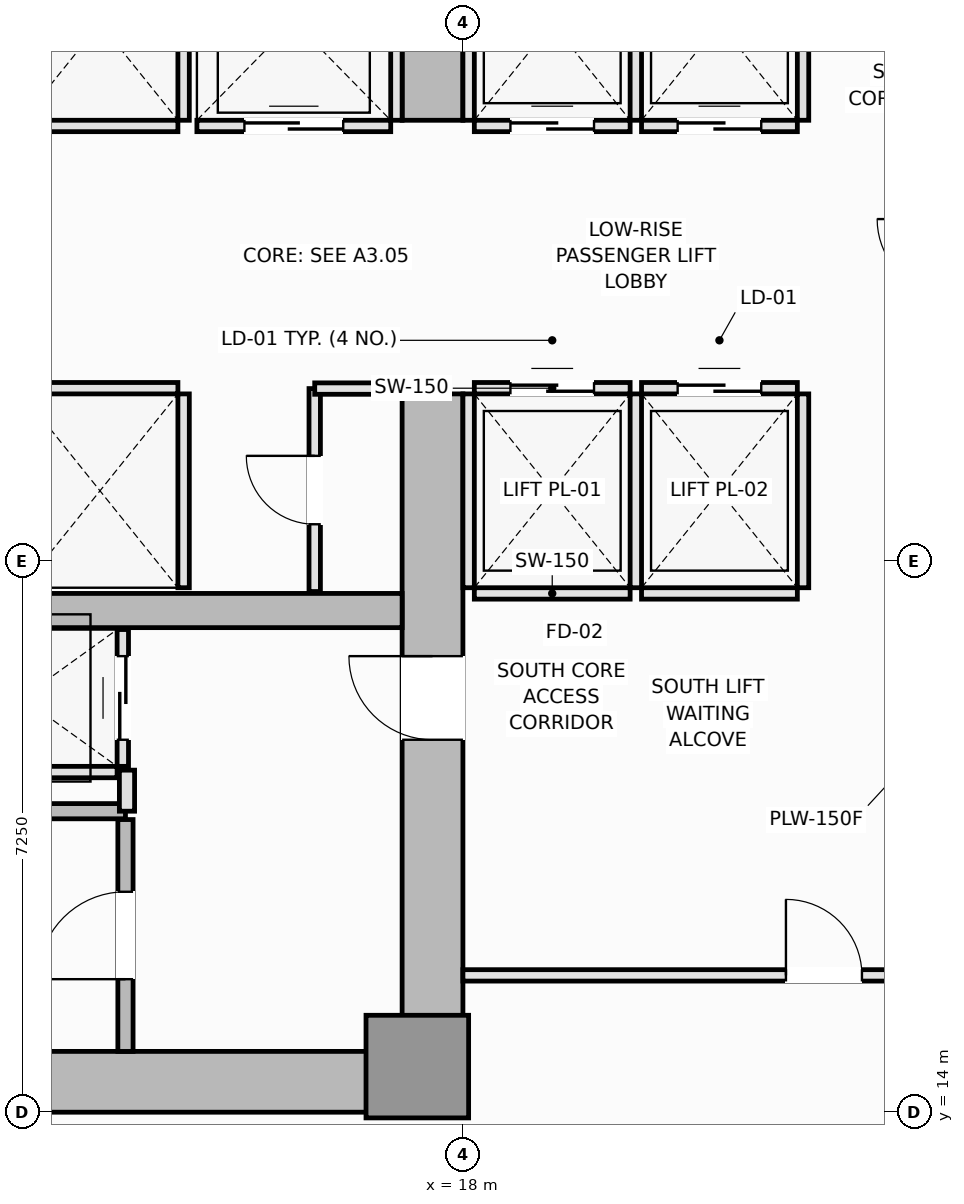
"""IFC4 building model, lengths in metres.
Left out: names, types, materials, properties, quantities, classifications, styles, units other than length and angle.
Written with IfcOpenShell. Run it as: python <this file> out.ifc"""

import sys

from ifc_helpers import new_model, si_unit, direction, frame, frame_2d, origin, origin_2d, place, context, subcontext, project, spatial, rectangle, extrude, element, fill, save


model = new_model("IFC4")
c1 = context("Model", 3, precision=1e-05, world=origin(), true_north=direction((0.0, 1.0)))
c2 = subcontext(c1, "Body", "Model", "MODEL_VIEW")
j1 = project(units=[si_unit("LENGTHUNIT", "METRE"), si_unit("PLANEANGLEUNIT", "RADIAN")], contexts=[c1])
p1 = place(None, origin())
s1 = spatial("IfcSite", under=j1, at=p1, CompositionType="ELEMENT")
p2 = place(p1, origin())
s2 = spatial("IfcBuilding", under=s1, at=p2, CompositionType="ELEMENT")
p3 = place(p2, frame((0.0, 0.0, 75.3)))
s3 = spatial("IfcBuildingStorey", under=s2, at=p3, CompositionType="ELEMENT", Elevation=75.3)
p4 = place(p3, frame((4.5, 14.4, 0.0), z_axis=(0.0, 0.0, 1.0), x_axis=(1.0, 0.0, 0.0)))
e1 = element("IfcWall", 1, at=p4, inside=s3, PredefinedType="SHEAR", context=c2, shape_type="SweptSolid", body=[
    extrude(rectangle(XDim=13.5, YDim=0.8, at=frame_2d((6.75, 0.0))), origin(), (0.0, 0.0, 1.0), 3.55),
])
p5 = place(p3, frame((17.6, 14.8, 0.0), z_axis=(0.0, 0.0, 1.0), x_axis=(0.0, 1.0, 0.0)))
e2 = element("IfcWall", 2, at=p5, inside=s3, PredefinedType="SHEAR", context=c2, shape_type="SweptSolid", body=[
    extrude(rectangle(XDim=8.65, YDim=0.8, at=frame_2d((4.325, 0.0))), origin(), (0.0, 0.0, 1.0), 3.55),
])
p6 = place(p5, frame((4.1, 0.0, 0.0)))
e3 = element("IfcOpeningElement", 3, at=p6, cuts=e2, PredefinedType="OPENING", context=c2, shape_type="SweptSolid", body=[
    extrude(rectangle(XDim=1.1, YDim=2.15, at=frame_2d((0.55, 1.075))), frame((0.0, 0.41, 0.0), z_axis=(0.0, -1.0, 0.0), x_axis=(1.0, 0.0, 0.0)), (0.0, 0.0, 1.0), 0.82),
])
p7 = place(p3, frame((17.6, 27.05, 0.0), z_axis=(0.0, 0.0, 1.0), x_axis=(0.0, 1.0, 0.0)))
e4 = element("IfcWall", 4, at=p7, inside=s3, PredefinedType="SHEAR", context=c2, shape_type="SweptSolid", body=[
    extrude(rectangle(XDim=8.65, YDim=0.8, at=frame_2d((4.325, 0.0))), origin(), (0.0, 0.0, 1.0), 3.55),
])
p8 = place(p7, frame((3.45, 0.0, 0.0)))
e5 = element("IfcOpeningElement", 5, at=p8, cuts=e4, PredefinedType="OPENING", context=c2, shape_type="SweptSolid", body=[
    extrude(rectangle(XDim=1.1, YDim=2.15, at=frame_2d((0.55, 1.075))), frame((0.0, 0.41, 0.0), z_axis=(0.0, -1.0, 0.0), x_axis=(1.0, 0.0, 0.0)), (0.0, 0.0, 1.0), 0.82),
])
p9 = place(p3, frame((5.3, 20.6, 0.0), z_axis=(0.0, 0.0, 1.0), x_axis=(1.0, 0.0, 0.0)))
e6 = element("IfcWall", 6, at=p9, inside=s3, PredefinedType="SHEAR", context=c2, shape_type="SweptSolid", body=[
    extrude(rectangle(XDim=11.9, YDim=0.45, at=frame_2d((5.95, 0.0))), origin(), (0.0, 0.0, 1.0), 3.55),
])
p10 = place(p3, frame((17.4, 14.6, 0.0), z_axis=(0.0, 0.0, 1.0), x_axis=(1.0, 0.0, 0.0)))
e7 = element("IfcColumn", 7, at=p10, inside=s3, PredefinedType="PILASTER", context=c2, shape_type="SweptSolid", body=[
    extrude(rectangle(XDim=1.35, YDim=1.35, at=origin_2d()), origin(), (0.0, 0.0, 1.0), 3.55),
])
p11 = place(p3, frame((5.9, 17.96, 0.0), z_axis=(0.0, 0.0, 1.0), x_axis=(1.0, 0.0, 0.0)))
e8 = element("IfcWall", 8, at=p11, inside=s3, PredefinedType="SOLIDWALL", context=c2, shape_type="SweptSolid", body=[
    extrude(rectangle(XDim=7.66, YDim=0.2, at=frame_2d((3.83, 0.0))), origin(), (0.0, 0.0, 1.0), 3.55),
])
p12 = place(p3, frame((13.56, 14.8, 0.0), z_axis=(0.0, 0.0, 1.0), x_axis=(0.0, 1.0, 0.0)))
e9 = element("IfcWall", 9, at=p12, inside=s3, PredefinedType="SOLIDWALL", context=c2, shape_type="SweptSolid", body=[
    extrude(rectangle(XDim=3.05, YDim=0.2, at=frame_2d((1.525, 0.0))), origin(), (0.0, 0.0, 1.0), 3.55),
])
p13 = place(p12, frame((0.95, 0.0, 0.0)))
e10 = element("IfcOpeningElement", 10, at=p13, cuts=e9, PredefinedType="OPENING", context=c2, shape_type="SweptSolid", body=[
    extrude(rectangle(XDim=1.15, YDim=2.15, at=frame_2d((0.575, 1.075))), frame((0.0, 0.11, 0.0), z_axis=(0.0, -1.0, 0.0), x_axis=(1.0, 0.0, 0.0)), (0.0, 0.0, 1.0), 0.22),
])
p14 = place(p3, frame((18.15, 20.825, 0.0), z_axis=(0.0, 0.0, 1.0), x_axis=(1.0, 0.0, 0.0)))
e11 = element("IfcWall", 11, at=p14, inside=s3, PredefinedType="PARTITIONING", context=c2, shape_type="SweptSolid", body=[
    extrude(rectangle(XDim=2.05, YDim=0.15, at=frame_2d((1.025, 0.0))), origin(), (0.0, 0.0, 1.0), 3.37),
])
p15 = place(p3, frame((18.15, 23.525, 0.0), z_axis=(0.0, 0.0, 1.0), x_axis=(1.0, 0.0, 0.0)))
e12 = element("IfcWall", 12, at=p15, inside=s3, PredefinedType="PARTITIONING", context=c2, shape_type="SweptSolid", body=[
    extrude(rectangle(XDim=2.05, YDim=0.15, at=frame_2d((1.025, 0.0))), origin(), (0.0, 0.0, 1.0), 3.37),
])
p16 = place(p15, frame((0.475, 0.0, 0.0)))
e13 = element("IfcOpeningElement", 13, at=p16, cuts=e12, PredefinedType="OPENING", context=c2, shape_type="SweptSolid", body=[
    extrude(rectangle(XDim=1.1, YDim=2.2, at=frame_2d((0.55, 1.1))), frame((0.0, 0.085, 0.0), z_axis=(0.0, -1.0, 0.0), x_axis=(1.0, 0.0, 0.0)), (0.0, 0.0, 1.0), 0.17),
])
for number, where, z_axis, x_axis in (
    (14, (18.075, 20.9, 0.0), (0.0, 0.0, 1.0), (0.0, 1.0, 0.0)),
    (15, (20.275, 20.9, 0.0), (0.0, 0.0, 1.0), (0.0, 1.0, 0.0)),
):
    element("IfcWall", number, at=place(p3, frame(where, z_axis=z_axis, x_axis=x_axis)), inside=s3, PredefinedType="PARTITIONING", context=c2, shape_type="SweptSolid", body=[
        extrude(rectangle(XDim=2.55, YDim=0.15, at=frame_2d((1.275, 0.0))), origin(), (0.0, 0.0, 1.0), 3.37),
    ])
p17 = place(p3, frame((20.35, 20.825, 0.0), z_axis=(0.0, 0.0, 1.0), x_axis=(1.0, 0.0, 0.0)))
e16 = element("IfcWall", 16, at=p17, inside=s3, PredefinedType="PARTITIONING", context=c2, shape_type="SweptSolid", body=[
    extrude(rectangle(XDim=2.05, YDim=0.15, at=frame_2d((1.025, 0.0))), origin(), (0.0, 0.0, 1.0), 3.37),
])
p18 = place(p3, frame((20.35, 23.525, 0.0), z_axis=(0.0, 0.0, 1.0), x_axis=(1.0, 0.0, 0.0)))
e17 = element("IfcWall", 17, at=p18, inside=s3, PredefinedType="PARTITIONING", context=c2, shape_type="SweptSolid", body=[
    extrude(rectangle(XDim=2.05, YDim=0.15, at=frame_2d((1.025, 0.0))), origin(), (0.0, 0.0, 1.0), 3.37),
])
p19 = place(p18, frame((0.475, 0.0, 0.0)))
e18 = element("IfcOpeningElement", 18, at=p19, cuts=e17, PredefinedType="OPENING", context=c2, shape_type="SweptSolid", body=[
    extrude(rectangle(XDim=1.1, YDim=2.2, at=frame_2d((0.55, 1.1))), frame((0.0, 0.085, 0.0), z_axis=(0.0, -1.0, 0.0), x_axis=(1.0, 0.0, 0.0)), (0.0, 0.0, 1.0), 0.17),
])
p20 = place(p3, frame((22.475, 20.9, 0.0), z_axis=(0.0, 0.0, 1.0), x_axis=(0.0, 1.0, 0.0)))
e19 = element("IfcWall", 19, at=p20, inside=s3, PredefinedType="PARTITIONING", context=c2, shape_type="SweptSolid", body=[
    extrude(rectangle(XDim=2.55, YDim=0.15, at=frame_2d((1.275, 0.0))), origin(), (0.0, 0.0, 1.0), 3.37),
])
p21 = place(p3, frame((18.15, 26.975, 0.0), z_axis=(0.0, 0.0, 1.0), x_axis=(1.0, 0.0, 0.0)))
e20 = element("IfcWall", 20, at=p21, inside=s3, PredefinedType="PARTITIONING", context=c2, shape_type="SweptSolid", body=[
    extrude(rectangle(XDim=2.05, YDim=0.15, at=frame_2d((1.025, 0.0))), origin(), (0.0, 0.0, 1.0), 3.37),
])
p22 = place(p21, frame((0.475, 0.0, 0.0)))
e21 = element("IfcOpeningElement", 21, at=p22, cuts=e20, PredefinedType="OPENING", context=c2, shape_type="SweptSolid", body=[
    extrude(rectangle(XDim=1.1, YDim=2.2, at=frame_2d((0.55, 1.1))), frame((0.0, 0.085, 0.0), z_axis=(0.0, -1.0, 0.0), x_axis=(1.0, 0.0, 0.0)), (0.0, 0.0, 1.0), 0.17),
])
for number, where, z_axis, x_axis in (
    (22, (18.075, 27.05, 0.0), (0.0, 0.0, 1.0), (0.0, 1.0, 0.0)),
    (23, (20.275, 27.05, 0.0), (0.0, 0.0, 1.0), (0.0, 1.0, 0.0)),
):
    element("IfcWall", number, at=place(p3, frame(where, z_axis=z_axis, x_axis=x_axis)), inside=s3, PredefinedType="PARTITIONING", context=c2, shape_type="SweptSolid", body=[
        extrude(rectangle(XDim=2.55, YDim=0.15, at=frame_2d((1.275, 0.0))), origin(), (0.0, 0.0, 1.0), 3.37),
    ])
p23 = place(p3, frame((20.35, 26.975, 0.0), z_axis=(0.0, 0.0, 1.0), x_axis=(1.0, 0.0, 0.0)))
e24 = element("IfcWall", 24, at=p23, inside=s3, PredefinedType="PARTITIONING", context=c2, shape_type="SweptSolid", body=[
    extrude(rectangle(XDim=2.05, YDim=0.15, at=frame_2d((1.025, 0.0))), origin(), (0.0, 0.0, 1.0), 3.37),
])
p24 = place(p23, frame((0.475, 0.0, 0.0)))
e25 = element("IfcOpeningElement", 25, at=p24, cuts=e24, PredefinedType="OPENING", context=c2, shape_type="SweptSolid", body=[
    extrude(rectangle(XDim=1.1, YDim=2.2, at=frame_2d((0.55, 1.1))), frame((0.0, 0.085, 0.0), z_axis=(0.0, -1.0, 0.0), x_axis=(1.0, 0.0, 0.0)), (0.0, 0.0, 1.0), 0.17),
])
p25 = place(p3, frame((22.475, 27.05, 0.0), z_axis=(0.0, 0.0, 1.0), x_axis=(0.0, 1.0, 0.0)))
e26 = element("IfcWall", 26, at=p25, inside=s3, PredefinedType="PARTITIONING", context=c2, shape_type="SweptSolid", body=[
    extrude(rectangle(XDim=2.55, YDim=0.15, at=frame_2d((1.275, 0.0))), origin(), (0.0, 0.0, 1.0), 3.37),
])
p26 = place(p3, frame((12.2, 23.525, 0.0), z_axis=(0.0, 0.0, 1.0), x_axis=(1.0, 0.0, 0.0)))
e27 = element("IfcWall", 27, at=p26, inside=s3, PredefinedType="PARTITIONING", context=c2, shape_type="SweptSolid", body=[
    extrude(rectangle(XDim=2.05, YDim=0.15, at=frame_2d((1.025, 0.0))), origin(), (0.0, 0.0, 1.0), 3.37),
])
p27 = place(p3, frame((14.325, 20.9, 0.0), z_axis=(0.0, 0.0, 1.0), x_axis=(0.0, 1.0, 0.0)))
e28 = element("IfcWall", 28, at=p27, inside=s3, PredefinedType="PARTITIONING", context=c2, shape_type="SweptSolid", body=[
    extrude(rectangle(XDim=2.55, YDim=0.15, at=frame_2d((1.275, 0.0))), origin(), (0.0, 0.0, 1.0), 3.37),
])
p28 = place(p3, frame((12.2, 26.975, 0.0), z_axis=(0.0, 0.0, 1.0), x_axis=(1.0, 0.0, 0.0)))
e29 = element("IfcWall", 29, at=p28, inside=s3, PredefinedType="PARTITIONING", context=c2, shape_type="SweptSolid", body=[
    extrude(rectangle(XDim=2.05, YDim=0.15, at=frame_2d((1.025, 0.0))), origin(), (0.0, 0.0, 1.0), 3.37),
])
p29 = place(p3, frame((14.325, 27.05, 0.0), z_axis=(0.0, 0.0, 1.0), x_axis=(0.0, 1.0, 0.0)))
e30 = element("IfcWall", 30, at=p29, inside=s3, PredefinedType="PARTITIONING", context=c2, shape_type="SweptSolid", body=[
    extrude(rectangle(XDim=2.55, YDim=0.15, at=frame_2d((1.275, 0.0))), origin(), (0.0, 0.0, 1.0), 3.37),
])
p30 = place(p3, frame((14.5, 26.975, 0.0), z_axis=(0.0, 0.0, 1.0), x_axis=(1.0, 0.0, 0.0)))
e31 = element("IfcWall", 31, at=p30, inside=s3, PredefinedType="PARTITIONING", context=c2, shape_type="SweptSolid", body=[
    extrude(rectangle(XDim=2.55, YDim=0.15, at=frame_2d((1.275, 0.0))), origin(), (0.0, 0.0, 1.0), 3.37),
])
p31 = place(p30, frame((0.625, 0.0, 0.0)))
e32 = element("IfcOpeningElement", 32, at=p31, cuts=e31, PredefinedType="OPENING", context=c2, shape_type="SweptSolid", body=[
    extrude(rectangle(XDim=1.3, YDim=2.2, at=frame_2d((0.65, 1.1))), frame((0.0, 0.085, 0.0), z_axis=(0.0, -1.0, 0.0), x_axis=(1.0, 0.0, 0.0)), (0.0, 0.0, 1.0), 0.17),
])
p32 = place(p3, frame((17.125, 27.05, 0.0), z_axis=(0.0, 0.0, 1.0), x_axis=(0.0, 1.0, 0.0)))
e33 = element("IfcWall", 33, at=p32, inside=s3, PredefinedType="PARTITIONING", context=c2, shape_type="SweptSolid", body=[
    extrude(rectangle(XDim=2.6, YDim=0.15, at=frame_2d((1.3, 0.0))), origin(), (0.0, 0.0, 1.0), 3.37),
])
p33 = place(p3, frame((10.95, 18.475, 0.0), z_axis=(0.0, 0.0, 1.0), x_axis=(1.0, 0.0, 0.0)))
e34 = element("IfcWall", 34, at=p33, inside=s3, PredefinedType="PARTITIONING", context=c2, shape_type="SweptSolid", body=[
    extrude(rectangle(XDim=2.5, YDim=0.15, at=frame_2d((1.25, 0.0))), origin(), (0.0, 0.0, 1.0), 3.37),
])
p34 = place(p3, frame((13.525, 18.55, 0.0), z_axis=(0.0, 0.0, 1.0), x_axis=(0.0, 1.0, 0.0)))
e35 = element("IfcWall", 35, at=p34, inside=s3, PredefinedType="PARTITIONING", context=c2, shape_type="SweptSolid", body=[
    extrude(rectangle(XDim=1.8, YDim=0.15, at=frame_2d((0.9, 0.0))), origin(), (0.0, 0.0, 1.0), 3.37),
])
p35 = place(p34, frame((0.35, 0.0, 0.0)))
e36 = element("IfcOpeningElement", 36, at=p35, cuts=e35, PredefinedType="OPENING", context=c2, shape_type="SweptSolid", body=[
    extrude(rectangle(XDim=1.1, YDim=2.2, at=frame_2d((0.55, 1.1))), frame((0.0, 0.085, 0.0), z_axis=(0.0, -1.0, 0.0), x_axis=(1.0, 0.0, 0.0)), (0.0, 0.0, 1.0), 0.17),
])
p36 = place(p3, frame((13.58, 17.96, 0.0), z_axis=(0.0, 0.0, 1.0), x_axis=(0.0, 1.0, 0.0)))
e37 = element("IfcWall", 37, at=p36, inside=s3, PredefinedType="PARTITIONING", context=c2, shape_type="SweptSolid", body=[
    extrude(rectangle(XDim=0.54, YDim=0.2, at=frame_2d((0.27, 0.0))), origin(), (0.0, 0.0, 1.0), 3.37),
])
p37 = place(p3, frame((16.05, 20.85, 0.0), z_axis=(0.0, 0.0, 1.0), x_axis=(0.0, 1.0, 0.0)))
e38 = element("IfcWall", 38, at=p37, inside=s3, PredefinedType="PARTITIONING", context=c2, shape_type="SweptSolid", body=[
    extrude(rectangle(XDim=2.67, YDim=0.15, at=frame_2d((1.335, 0.0))), origin(), (0.0, 0.0, 1.0), 3.37),
])
p38 = place(p37, frame((0.885, 0.0, 0.0)))
e39 = element("IfcOpeningElement", 39, at=p38, cuts=e38, PredefinedType="OPENING", context=c2, shape_type="SweptSolid", body=[
    extrude(rectangle(XDim=0.9, YDim=2.1, at=frame_2d((0.45, 1.05))), frame((0.0, 0.085, 0.0), z_axis=(0.0, -1.0, 0.0), x_axis=(1.0, 0.0, 0.0)), (0.0, 0.0, 1.0), 0.17),
])
p39 = place(p3, frame((16.05, 23.52, 0.0), z_axis=(0.0, 0.0, 1.0), x_axis=(1.0, 0.0, 0.0)))
e40 = element("IfcWall", 40, at=p39, inside=s3, PredefinedType="PARTITIONING", context=c2, shape_type="SweptSolid", body=[
    extrude(rectangle(XDim=1.17, YDim=0.15, at=frame_2d((0.585, 0.0))), origin(), (0.0, 0.0, 1.0), 3.37),
])
p40 = place(p3, frame((18.0, 15.8, 0.0), z_axis=(0.0, 0.0, 1.0), x_axis=(1.0, 0.0, 0.0)))
e41 = element("IfcWall", 41, at=p40, inside=s3, PredefinedType="PARTITIONING", context=c2, shape_type="SweptSolid", body=[
    extrude(rectangle(XDim=9.5, YDim=0.15, at=frame_2d((4.75, 0.0))), origin(), (0.0, 0.0, 1.0), 3.37),
])
p41 = place(p40, frame((4.25, 0.0, 0.0)))
e42 = element("IfcOpeningElement", 42, at=p41, cuts=e41, PredefinedType="OPENING", context=c2, shape_type="SweptSolid", body=[
    extrude(rectangle(XDim=1.0, YDim=2.15, at=frame_2d((0.5, 1.075))), frame((0.0, 0.085, 0.0), z_axis=(0.0, -1.0, 0.0), x_axis=(1.0, 0.0, 0.0)), (0.0, 0.0, 1.0), 0.17),
])
p42 = place(p13, origin())
e43 = element("IfcDoor", 43, at=p42, inside=s3, OperationType="SINGLE_SWING_LEFT", PredefinedType="DOOR", context=c2, shape_type="SweptSolid", body=[
    extrude(rectangle(XDim=1.15, YDim=2.15, at=frame_2d((0.575, 1.075))), frame((0.0, 0.025, 0.0), z_axis=(0.0, -1.0, 0.0), x_axis=(1.0, 0.0, 0.0)), (0.0, 0.0, 1.0), 0.05),
])
fill(e10, e43)
p43 = place(p16, origin())
e44 = element("IfcDoor", 44, at=p43, inside=s3, OperationType="DOUBLE_DOOR_SLIDING", PredefinedType="DOOR", context=c2, shape_type="SweptSolid", body=[
    extrude(rectangle(XDim=1.1, YDim=2.2, at=frame_2d((0.55, 1.1))), frame((0.0, 0.025, 0.0), z_axis=(0.0, -1.0, 0.0), x_axis=(1.0, 0.0, 0.0)), (0.0, 0.0, 1.0), 0.05),
])
fill(e13, e44)
p44 = place(p19, origin())
e45 = element("IfcDoor", 45, at=p44, inside=s3, OperationType="DOUBLE_DOOR_SLIDING", PredefinedType="DOOR", context=c2, shape_type="SweptSolid", body=[
    extrude(rectangle(XDim=1.1, YDim=2.2, at=frame_2d((0.55, 1.1))), frame((0.0, 0.025, 0.0), z_axis=(0.0, -1.0, 0.0), x_axis=(1.0, 0.0, 0.0)), (0.0, 0.0, 1.0), 0.05),
])
fill(e18, e45)
p45 = place(p22, origin())
e46 = element("IfcDoor", 46, at=p45, inside=s3, OperationType="DOUBLE_DOOR_SLIDING", PredefinedType="DOOR", context=c2, shape_type="SweptSolid", body=[
    extrude(rectangle(XDim=1.1, YDim=2.2, at=frame_2d((0.55, 1.1))), frame((0.0, 0.025, 0.0), z_axis=(0.0, -1.0, 0.0), x_axis=(1.0, 0.0, 0.0)), (0.0, 0.0, 1.0), 0.05),
])
fill(e21, e46)
p46 = place(p24, origin())
e47 = element("IfcDoor", 47, at=p46, inside=s3, OperationType="DOUBLE_DOOR_SLIDING", PredefinedType="DOOR", context=c2, shape_type="SweptSolid", body=[
    extrude(rectangle(XDim=1.1, YDim=2.2, at=frame_2d((0.55, 1.1))), frame((0.0, 0.025, 0.0), z_axis=(0.0, -1.0, 0.0), x_axis=(1.0, 0.0, 0.0)), (0.0, 0.0, 1.0), 0.05),
])
fill(e25, e47)
p47 = place(p31, origin())
e48 = element("IfcDoor", 48, at=p47, inside=s3, OperationType="DOUBLE_DOOR_SLIDING", PredefinedType="DOOR", context=c2, shape_type="SweptSolid", body=[
    extrude(rectangle(XDim=1.3, YDim=2.2, at=frame_2d((0.65, 1.1))), frame((0.0, 0.025, 0.0), z_axis=(0.0, -1.0, 0.0), x_axis=(1.0, 0.0, 0.0)), (0.0, 0.0, 1.0), 0.05),
])
fill(e32, e48)
p48 = place(p35, origin())
e49 = element("IfcDoor", 49, at=p48, inside=s3, OperationType="DOUBLE_DOOR_SLIDING", PredefinedType="DOOR", context=c2, shape_type="SweptSolid", body=[
    extrude(rectangle(XDim=1.1, YDim=2.2, at=frame_2d((0.55, 1.1))), frame((0.0, 0.025, 0.0), z_axis=(0.0, -1.0, 0.0), x_axis=(1.0, 0.0, 0.0)), (0.0, 0.0, 1.0), 0.05),
])
fill(e36, e49)
p49 = place(p6, origin())
e50 = element("IfcDoor", 50, at=p49, inside=s3, OperationType="SINGLE_SWING_RIGHT", PredefinedType="DOOR", context=c2, shape_type="SweptSolid", body=[
    extrude(rectangle(XDim=1.1, YDim=2.15, at=frame_2d((0.55, 1.075))), frame((0.0, 0.025, 0.0), z_axis=(0.0, -1.0, 0.0), x_axis=(1.0, 0.0, 0.0)), (0.0, 0.0, 1.0), 0.05),
])
fill(e3, e50)
p50 = place(p38, origin())
e51 = element("IfcDoor", 51, at=p50, inside=s3, OperationType="SINGLE_SWING_RIGHT", PredefinedType="DOOR", context=c2, shape_type="SweptSolid", body=[
    extrude(rectangle(XDim=0.9, YDim=2.1, at=frame_2d((0.45, 1.05))), frame((0.0, 0.025, 0.0), z_axis=(0.0, -1.0, 0.0), x_axis=(1.0, 0.0, 0.0)), (0.0, 0.0, 1.0), 0.05),
])
fill(e39, e51)
p51 = place(p41, origin())
e52 = element("IfcDoor", 52, at=p51, inside=s3, OperationType="SINGLE_SWING_LEFT", PredefinedType="DOOR", context=c2, shape_type="SweptSolid", body=[
    extrude(rectangle(XDim=1.0, YDim=2.15, at=frame_2d((0.5, 1.075))), frame((0.0, 0.025, 0.0), z_axis=(0.0, -1.0, 0.0), x_axis=(1.0, 0.0, 0.0)), (0.0, 0.0, 1.0), 0.05),
])
fill(e42, e52)
save(model, sys.argv[1])
